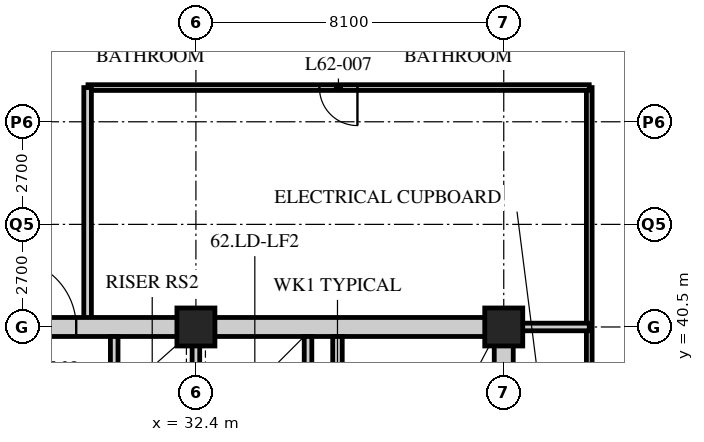
"""IFC4 building model, lengths in metres.
Left out: names, types, materials, properties, quantities, classifications, styles, units other than length and angle.
Written with IfcOpenShell. Run it as: python <this file> out.ifc"""

import sys

from ifc_helpers import new_model, si_unit, direction, frame, frame_2d, origin, origin_2d, place, context, subcontext, project, spatial, rectangle, hollow_rectangle, extrude, element, fill, save


model = new_model("IFC4")
c1 = context("Model", 3, precision=1e-05, world=origin(), true_north=direction((0.0, 1.0)))
c2 = subcontext(c1, "Body", "Model", "MODEL_VIEW")
j1 = project(units=[si_unit("LENGTHUNIT", "METRE"), si_unit("PLANEANGLEUNIT", "RADIAN")], contexts=[c1])
p1 = place(None, origin())
s1 = spatial("IfcSite", under=j1, at=p1, CompositionType="ELEMENT")
p2 = place(p1, origin())
s2 = spatial("IfcBuilding", under=s1, at=p2, CompositionType="ELEMENT")
p3 = place(p2, frame((0.0, 0.0, 242.4)))
s3 = spatial("IfcBuildingStorey", under=s2, at=p3, CompositionType="ELEMENT", Elevation=242.4)
for number, where, z_axis, x_axis in (
    (1, (32.4, 40.5, 0.0), (0.0, 0.0, 1.0), (1.0, 0.0, 0.0)),
    (2, (40.5, 40.5, 0.0), (0.0, 0.0, 1.0), (1.0, 0.0, 0.0)),
):
    element("IfcColumn", number, at=place(p3, frame(where, z_axis=z_axis, x_axis=x_axis)), inside=s3, PredefinedType="COLUMN", context=c2, shape_type="SweptSolid", body=[
        extrude(hollow_rectangle(XDim=1.0, YDim=1.0, WallThickness=0.1, at=origin_2d()), origin(), (0.0, 0.0, 1.0), 3.9),
    ])
p4 = place(p3, frame((42.75, 24.3, 0.0), z_axis=(0.0, 0.0, 1.0), x_axis=(0.0, 1.0, 0.0)))
e3 = element("IfcWall", 3, at=p4, inside=s3, PredefinedType="PARTITIONING", context=c2, shape_type="SweptSolid", body=[
    extrude(rectangle(XDim=22.5, YDim=0.15, at=frame_2d((11.25, 0.0))), origin(), (0.0, 0.0, 1.0), 3.69),
])
p5 = place(p4, frame((3.55, 0.0, 0.0)))
e4 = element("IfcOpeningElement", 4, at=p5, cuts=e3, PredefinedType="OPENING", context=c2, shape_type="SweptSolid", body=[
    extrude(rectangle(XDim=1.0, YDim=2.1, at=frame_2d((0.5, 1.05))), frame((0.0, 0.085, 0.0), z_axis=(0.0, -1.0, 0.0), x_axis=(1.0, 0.0, 0.0)), (0.0, 0.0, 1.0), 0.17),
])
p6 = place(p4, frame((11.65, 0.0, 0.0)))
e5 = element("IfcOpeningElement", 5, at=p6, cuts=e3, PredefinedType="OPENING", context=c2, shape_type="SweptSolid", body=[
    extrude(rectangle(XDim=1.0, YDim=2.1, at=frame_2d((0.5, 1.05))), frame((0.0, 0.085, 0.0), z_axis=(0.0, -1.0, 0.0), x_axis=(1.0, 0.0, 0.0)), (0.0, 0.0, 1.0), 0.17),
])
p7 = place(p3, frame((42.75, 46.8, 0.0), z_axis=(0.0, 0.0, 1.0), x_axis=(-1.0, 0.0, 0.0)))
e6 = element("IfcWall", 6, at=p7, inside=s3, PredefinedType="PARTITIONING", context=c2, shape_type="SweptSolid", body=[
    extrude(rectangle(XDim=13.19, YDim=0.15, at=frame_2d((6.595, 0.0))), origin(), (0.0, 0.0, 1.0), 3.69),
])
p8 = place(p7, frame((6.1, 0.0, 0.0)))
e7 = element("IfcOpeningElement", 7, at=p8, cuts=e6, PredefinedType="OPENING", context=c2, shape_type="SweptSolid", body=[
    extrude(rectangle(XDim=1.0, YDim=2.1, at=frame_2d((0.5, 1.05))), frame((0.0, 0.085, 0.0), z_axis=(0.0, -1.0, 0.0), x_axis=(1.0, 0.0, 0.0)), (0.0, 0.0, 1.0), 0.17),
])
p9 = place(p3, frame((29.55, 40.5, 0.0), z_axis=(0.0, 0.0, 1.0), x_axis=(0.0, 1.0, 0.0)))
e8 = element("IfcWall", 8, at=p9, inside=s3, PredefinedType="SOLIDWALL", context=c2, shape_type="SweptSolid", body=[
    extrude(rectangle(XDim=6.3, YDim=0.2, at=frame_2d((3.15, 0.0))), origin(), (0.0, 0.0, 1.0), 3.69),
])
p10 = place(p3, frame((40.5, 40.5, 0.0), z_axis=(0.0, 0.0, 1.0), x_axis=(1.0, 0.0, 0.0)))
e9 = element("IfcWall", 9, at=p10, inside=s3, PredefinedType="SOLIDWALL", context=c2, shape_type="SweptSolid", body=[
    extrude(rectangle(XDim=2.25, YDim=0.2, at=frame_2d((1.125, 0.0))), origin(), (0.0, 0.0, 1.0), 2.928),
])
p11 = place(p3, frame((15.95, 40.5, 0.0), z_axis=(0.0, 0.0, 1.0), x_axis=(1.0, 0.0, 0.0)))
e10 = element("IfcWall", 10, at=p11, inside=s3, PredefinedType="SOLIDWALL", context=c2, shape_type="SweptSolid", body=[
    extrude(rectangle(XDim=24.8, YDim=0.5, at=frame_2d((12.4, 0.0))), origin(), (0.0, 0.0, 1.0), 2.928),
])
p12 = place(p11, frame((11.5, 0.0, 0.0)))
e11 = element("IfcOpeningElement", 11, at=p12, cuts=e10, PredefinedType="OPENING", context=c2, shape_type="SweptSolid", body=[
    extrude(rectangle(XDim=1.8, YDim=2.4, at=frame_2d((0.9, 1.2))), frame((0.0, 0.26, 0.0), z_axis=(0.0, -1.0, 0.0), x_axis=(1.0, 0.0, 0.0)), (0.0, 0.0, 1.0), 0.52),
])
p13 = place(p3, frame((40.5, 24.55, 0.0), z_axis=(0.0, 0.0, 1.0), x_axis=(0.0, 1.0, 0.0)))
e12 = element("IfcWall", 12, at=p13, inside=s3, PredefinedType="SOLIDWALL", context=c2, shape_type="SweptSolid", body=[
    extrude(rectangle(XDim=15.7, YDim=0.5, at=frame_2d((7.85, 0.0))), origin(), (0.0, 0.0, 1.0), 2.928),
])
p14 = place(p3, frame((32.4, 32.5, 0.0), z_axis=(0.0, 0.0, 1.0), x_axis=(0.0, 1.0, 0.0)))
e13 = element("IfcWall", 13, at=p14, inside=s3, PredefinedType="SOLIDWALL", context=c2, shape_type="SweptSolid", body=[
    extrude(rectangle(XDim=7.75, YDim=0.2, at=frame_2d((3.875, 0.0))), origin(), (0.0, 0.0, 1.0), 3.078),
])
p15 = place(p14, frame((1.9, 0.0, 0.0)))
e14 = element("IfcOpeningElement", 14, at=p15, cuts=e13, PredefinedType="OPENING", context=c2, shape_type="SweptSolid", body=[
    extrude(rectangle(XDim=1.2, YDim=2.1, at=frame_2d((0.6, 1.05))), frame((0.0, 0.11, 0.0), z_axis=(0.0, -1.0, 0.0), x_axis=(1.0, 0.0, 0.0)), (0.0, 0.0, 1.0), 0.22),
])
p16 = place(p3, frame((36.125, 32.5, 0.0), z_axis=(0.0, 0.0, 1.0), x_axis=(0.0, 1.0, 0.0)))
e15 = element("IfcWall", 15, at=p16, inside=s3, PredefinedType="SOLIDWALL", context=c2, shape_type="SweptSolid", body=[
    extrude(rectangle(XDim=7.75, YDim=0.25, at=frame_2d((3.875, 0.0))), origin(), (0.0, 0.0, 1.0), 3.69),
])
p17 = place(p16, frame((0.45, 0.0, 0.0)))
e16 = element("IfcOpeningElement", 16, at=p17, cuts=e15, PredefinedType="OPENING", context=c2, shape_type="SweptSolid", body=[
    extrude(rectangle(XDim=1.2, YDim=2.1, at=frame_2d((0.6, 1.05))), frame((0.0, 0.135, 0.0), z_axis=(0.0, -1.0, 0.0), x_axis=(1.0, 0.0, 0.0)), (0.0, 0.0, 1.0), 0.27),
])
p18 = place(p3, frame((35.35, 37.65, 0.0), z_axis=(0.0, 0.0, 1.0), x_axis=(0.0, 1.0, 0.0)))
e17 = element("IfcWall", 17, at=p18, inside=s3, PredefinedType="SOLIDWALL", context=c2, shape_type="SweptSolid", body=[
    extrude(rectangle(XDim=2.6, YDim=0.2, at=frame_2d((1.3, 0.0))), origin(), (0.0, 0.0, 1.0), 3.69),
])
p19 = place(p3, frame((30.25, 38.65, 0.0), z_axis=(0.0, 0.0, 1.0), x_axis=(0.0, 1.0, 0.0)))
e18 = element("IfcWall", 18, at=p19, inside=s3, PredefinedType="SOLIDWALL", context=c2, shape_type="SweptSolid", body=[
    extrude(rectangle(XDim=1.6, YDim=0.2, at=frame_2d((0.8, 0.0))), origin(), (0.0, 0.0, 1.0), 3.69),
])
p20 = place(p8, origin())
e19 = element("IfcDoor", 19, at=p20, inside=s3, OperationType="SINGLE_SWING_LEFT", PredefinedType="DOOR", context=c2, shape_type="SweptSolid", body=[
    extrude(rectangle(XDim=1.0, YDim=2.1, at=frame_2d((0.5, 1.05))), frame((0.0, 0.025, 0.0), z_axis=(0.0, -1.0, 0.0), x_axis=(1.0, 0.0, 0.0)), (0.0, 0.0, 1.0), 0.05),
])
fill(e7, e19)
p21 = place(p12, origin())
e20 = element("IfcDoor", 20, at=p21, inside=s3, OperationType="DOUBLE_DOOR_SINGLE_SWING", PredefinedType="DOOR", context=c2, shape_type="SweptSolid", body=[
    extrude(rectangle(XDim=1.8, YDim=2.4, at=frame_2d((0.9, 1.2))), frame((0.0, 0.025, 0.0), z_axis=(0.0, -1.0, 0.0), x_axis=(1.0, 0.0, 0.0)), (0.0, 0.0, 1.0), 0.05),
])
fill(e11, e20)
save(model, sys.argv[1])
